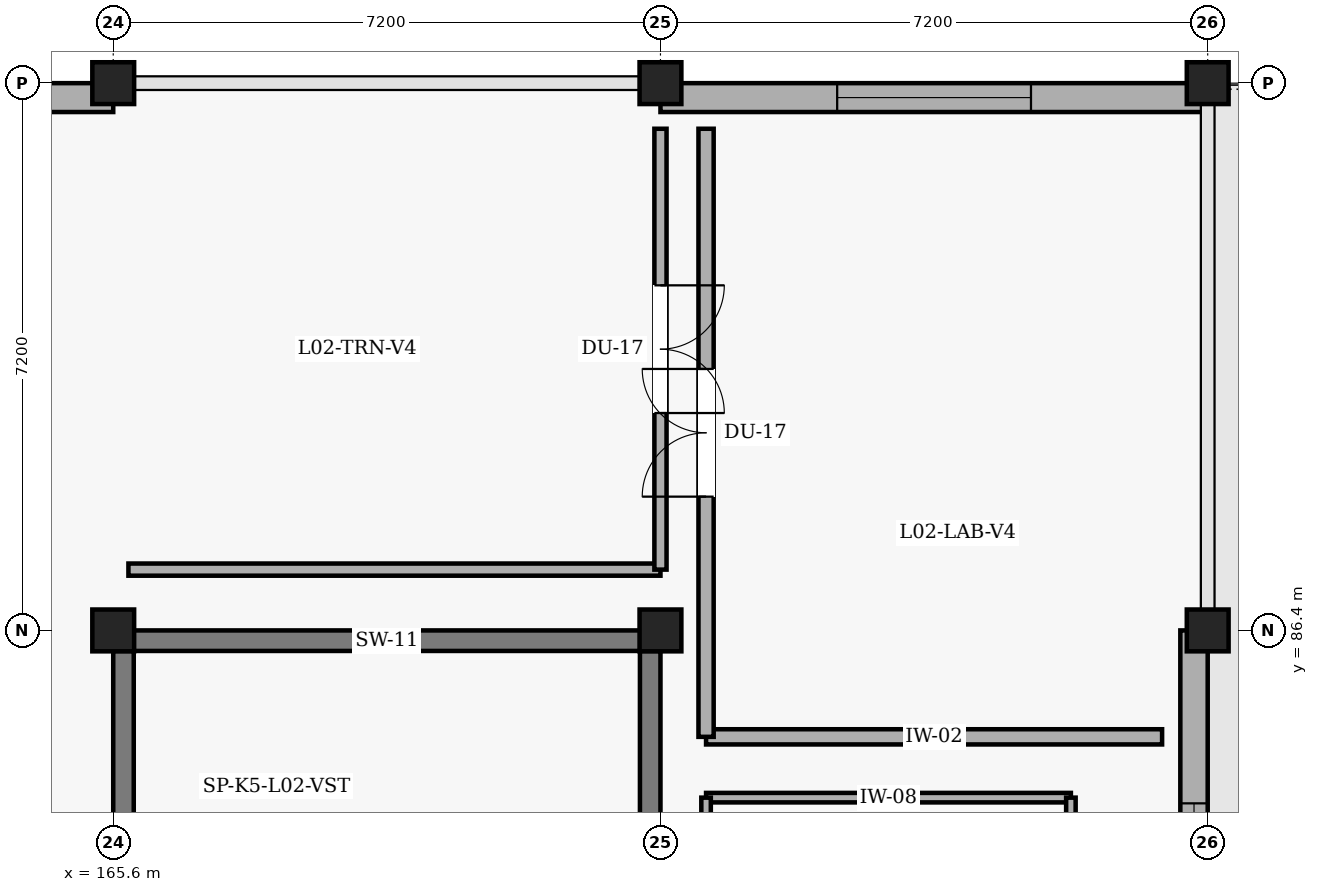
"""IFC4 building model, lengths in metres.
Left out: names, types, materials, properties, quantities, classifications, styles, units other than length and angle.
Written with IfcOpenShell. Run it as: python <this file> out.ifc"""

import sys

from ifc_helpers import new_model, si_unit, direction, frame, frame_2d, origin, origin_2d, place, context, subcontext, project, spatial, rectangle, extrude, element, fill, save


model = new_model("IFC4")
c1 = context("Model", 3, precision=1e-05, world=origin(), true_north=direction((0.0, 1.0)))
c2 = subcontext(c1, "Body", "Model", "MODEL_VIEW")
j1 = project(units=[si_unit("LENGTHUNIT", "METRE"), si_unit("PLANEANGLEUNIT", "RADIAN")], contexts=[c1])
p1 = place(None, origin())
s1 = spatial("IfcSite", under=j1, at=p1, CompositionType="ELEMENT")
p2 = place(p1, origin())
s2 = spatial("IfcBuilding", under=s1, at=p2, CompositionType="ELEMENT")
p3 = place(p2, frame((0.0, 0.0, 9.6)))
s3 = spatial("IfcBuildingStorey", under=s2, at=p3, CompositionType="ELEMENT", Elevation=9.6)
p4 = place(p3, frame((165.6, 86.265, 0.0), z_axis=(0.0, 0.0, 1.0), x_axis=(1.0, 0.0, 0.0)))
e1 = element("IfcWall", 1, at=p4, inside=s3, PredefinedType="SHEAR", context=c2, shape_type="SweptSolid", body=[
    extrude(rectangle(XDim=7.2, YDim=0.27, at=frame_2d((3.6, 0.0))), origin(), (0.0, 0.0, 1.0), 4.2),
])
p5 = place(p3, frame((172.665, 86.13, 0.0), z_axis=(0.0, 0.0, 1.0), x_axis=(0.0, -1.0, 0.0)))
e2 = element("IfcWall", 2, at=p5, inside=s3, PredefinedType="SHEAR", context=c2, shape_type="SweptSolid", body=[
    extrude(rectangle(XDim=13.86, YDim=0.27, at=frame_2d((6.93, 0.0))), origin(), (0.0, 0.0, 1.0), 4.2),
])
p6 = place(p3, frame((165.735, 72.27, 0.0), z_axis=(0.0, 0.0, 1.0), x_axis=(0.0, 1.0, 0.0)))
e3 = element("IfcWall", 3, at=p6, inside=s3, PredefinedType="SHEAR", context=c2, shape_type="SweptSolid", body=[
    extrude(rectangle(XDim=13.86, YDim=0.27, at=frame_2d((6.93, 0.0))), origin(), (0.0, 0.0, 1.0), 4.2),
])
p7 = place(p6, frame((9.8, 0.0, 0.0)))
e4 = element("IfcOpeningElement", 4, at=p7, cuts=e3, PredefinedType="OPENING", context=c2, shape_type="SweptSolid", body=[
    extrude(rectangle(XDim=1.25, YDim=2.2, at=frame_2d((0.625, 1.1))), frame((0.0, 0.145, 0.0), z_axis=(0.0, -1.0, 0.0), x_axis=(1.0, 0.0, 0.0)), (0.0, 0.0, 1.0), 0.29),
])
p8 = place(p3, frame((165.6, 86.4, 0.0), z_axis=(0.0, 0.0, 1.0), x_axis=(1.0, 0.0, 0.0)))
e5 = element("IfcColumn", 5, at=p8, inside=s3, PredefinedType="COLUMN", context=c2, shape_type="SweptSolid", body=[
    extrude(rectangle(XDim=0.55, YDim=0.55, at=origin_2d()), origin(), (0.0, 0.0, 1.0), 3.92),
])
p9 = place(p3, frame((165.6, 93.6, 0.0), z_axis=(0.0, 0.0, 1.0), x_axis=(1.0, 0.0, 0.0)))
e6 = element("IfcColumn", 6, at=p9, inside=s3, PredefinedType="COLUMN", context=c2, shape_type="SweptSolid", body=[
    extrude(rectangle(XDim=0.55, YDim=0.55, at=origin_2d()), origin(), (0.0, 0.0, 1.0), 3.95),
])
p10 = place(p3, frame((172.8, 86.4, 0.0), z_axis=(0.0, 0.0, 1.0), x_axis=(1.0, 0.0, 0.0)))
e7 = element("IfcColumn", 7, at=p10, inside=s3, PredefinedType="COLUMN", context=c2, shape_type="SweptSolid", body=[
    extrude(rectangle(XDim=0.55, YDim=0.55, at=origin_2d()), origin(), (0.0, 0.0, 1.0), 3.92),
])
p11 = place(p3, frame((172.8, 93.6, 0.0), z_axis=(0.0, 0.0, 1.0), x_axis=(1.0, 0.0, 0.0)))
e8 = element("IfcColumn", 8, at=p11, inside=s3, PredefinedType="COLUMN", context=c2, shape_type="SweptSolid", body=[
    extrude(rectangle(XDim=0.55, YDim=0.55, at=origin_2d()), origin(), (0.0, 0.0, 1.0), 3.95),
])
p12 = place(p3, frame((180.0, 86.4, 0.0), z_axis=(0.0, 0.0, 1.0), x_axis=(1.0, 0.0, 0.0)))
e9 = element("IfcColumn", 9, at=p12, inside=s3, PredefinedType="COLUMN", context=c2, shape_type="SweptSolid", body=[
    extrude(rectangle(XDim=0.55, YDim=0.55, at=origin_2d()), origin(), (0.0, 0.0, 1.0), 3.92),
])
p13 = place(p3, frame((180.0, 93.6, 0.0), z_axis=(0.0, 0.0, 1.0), x_axis=(1.0, 0.0, 0.0)))
e10 = element("IfcColumn", 10, at=p13, inside=s3, PredefinedType="COLUMN", context=c2, shape_type="SweptSolid", body=[
    extrude(rectangle(XDim=0.55, YDim=0.55, at=origin_2d()), origin(), (0.0, 0.0, 1.0), 3.95),
])
p14 = place(p3, frame((158.4, 93.41, 0.0), z_axis=(0.0, 0.0, 1.0), x_axis=(1.0, 0.0, 0.0)))
e11 = element("IfcWall", 11, at=p14, inside=s3, PredefinedType="SOLIDWALL", context=c2, shape_type="SweptSolid", body=[
    extrude(rectangle(XDim=7.2, YDim=0.38, at=frame_2d((3.6, 0.0))), origin(), (0.0, 0.0, 1.0), 3.65),
])
p15 = place(p14, frame((2.375, 0.0, 0.9)))
e12 = element("IfcOpeningElement", 12, at=p15, cuts=e11, PredefinedType="OPENING", context=c2, shape_type="SweptSolid", body=[
    extrude(rectangle(XDim=2.45, YDim=1.55, at=frame_2d((1.225, 0.775))), frame((0.0, 0.2, 0.0), z_axis=(0.0, -1.0, 0.0), x_axis=(1.0, 0.0, 0.0)), (0.0, 0.0, 1.0), 0.4),
])
p16 = place(p3, frame((172.8, 93.41, 0.0), z_axis=(0.0, 0.0, 1.0), x_axis=(1.0, 0.0, 0.0)))
e13 = element("IfcWall", 13, at=p16, inside=s3, PredefinedType="SOLIDWALL", context=c2, shape_type="SweptSolid", body=[
    extrude(rectangle(XDim=7.2, YDim=0.38, at=frame_2d((3.6, 0.0))), origin(), (0.0, 0.0, 1.0), 3.65),
])
p17 = place(p16, frame((2.325, 0.0, 0.9)))
e14 = element("IfcOpeningElement", 14, at=p17, cuts=e13, PredefinedType="OPENING", context=c2, shape_type="SweptSolid", body=[
    extrude(rectangle(XDim=2.55, YDim=1.6, at=frame_2d((1.275, 0.8))), frame((0.0, 0.2, 0.0), z_axis=(0.0, -1.0, 0.0), x_axis=(1.0, 0.0, 0.0)), (0.0, 0.0, 1.0), 0.4),
])
p18 = place(p3, frame((179.82, 86.4, 0.0), z_axis=(0.0, 0.0, 1.0), x_axis=(0.0, -1.0, 0.0)))
e15 = element("IfcWall", 15, at=p18, inside=s3, PredefinedType="SOLIDWALL", context=c2, shape_type="SweptSolid", body=[
    extrude(rectangle(XDim=7.2, YDim=0.36, at=frame_2d((3.6, 0.0))), origin(), (0.0, 0.0, 1.0), 3.62),
])
p19 = place(p18, frame((2.275, 0.0, 0.9)))
e16 = element("IfcOpeningElement", 16, at=p19, cuts=e15, PredefinedType="OPENING", context=c2, shape_type="SweptSolid", body=[
    extrude(rectangle(XDim=2.65, YDim=1.7, at=frame_2d((1.325, 0.85))), frame((0.0, 0.19, 0.0), z_axis=(0.0, -1.0, 0.0), x_axis=(1.0, 0.0, 0.0)), (0.0, 0.0, 1.0), 0.38),
])
p20 = place(p3, frame((173.4, 84.2, 0.0), z_axis=(0.0, 0.0, 1.0), x_axis=(1.0, 0.0, 0.0)))
e17 = element("IfcWall", 17, at=p20, inside=s3, PredefinedType="PARTITIONING", context=c2, shape_type="SweptSolid", body=[
    extrude(rectangle(XDim=4.8, YDim=0.125, at=frame_2d((2.4, 0.0))), origin(), (0.0, 0.0, 1.0), 3.85),
])
p21 = place(p3, frame((178.2, 84.2, 0.0), z_axis=(0.0, 0.0, 1.0), x_axis=(0.0, -1.0, 0.0)))
e18 = element("IfcWall", 18, at=p21, inside=s3, PredefinedType="PARTITIONING", context=c2, shape_type="SweptSolid", body=[
    extrude(rectangle(XDim=4.8, YDim=0.125, at=frame_2d((2.4, 0.0))), origin(), (0.0, 0.0, 1.0), 3.65),
])
p22 = place(p3, frame((173.4, 79.4, 0.0), z_axis=(0.0, 0.0, 1.0), x_axis=(0.0, 1.0, 0.0)))
e19 = element("IfcWall", 19, at=p22, inside=s3, PredefinedType="PARTITIONING", context=c2, shape_type="SweptSolid", body=[
    extrude(rectangle(XDim=4.8, YDim=0.125, at=frame_2d((2.4, 0.0))), origin(), (0.0, 0.0, 1.0), 3.65),
])
p23 = place(p22, frame((1.875, 0.0, 0.0)))
e20 = element("IfcOpeningElement", 20, at=p23, cuts=e19, PredefinedType="OPENING", context=c2, shape_type="SweptSolid", body=[
    extrude(rectangle(XDim=1.05, YDim=2.1, at=frame_2d((0.525, 1.05))), frame((0.0, 0.073, 0.0), z_axis=(0.0, -1.0, 0.0), x_axis=(1.0, 0.0, 0.0)), (0.0, 0.0, 1.0), 0.145),
])
p24 = place(p3, frame((179.4, 85.0, 0.0), z_axis=(0.0, 0.0, 1.0), x_axis=(-1.0, 0.0, 0.0)))
e21 = element("IfcWall", 21, at=p24, inside=s3, PredefinedType="PARTITIONING", context=c2, shape_type="SweptSolid", body=[
    extrude(rectangle(XDim=6.0, YDim=0.2, at=frame_2d((3.0, 0.0))), origin(), (0.0, 0.0, 1.0), 3.85),
])
p25 = place(p3, frame((173.4, 85.0, 0.0), z_axis=(0.0, 0.0, 1.0), x_axis=(0.0, 1.0, 0.0)))
e22 = element("IfcWall", 22, at=p25, inside=s3, PredefinedType="PARTITIONING", context=c2, shape_type="SweptSolid", body=[
    extrude(rectangle(XDim=8.0, YDim=0.2, at=frame_2d((4.0, 0.0))), origin(), (0.0, 0.0, 1.0), 3.62),
])
p26 = place(p25, frame((3.16, 0.0, 0.0)))
e23 = element("IfcOpeningElement", 23, at=p26, cuts=e22, PredefinedType="OPENING", context=c2, shape_type="SweptSolid", body=[
    extrude(rectangle(XDim=1.68, YDim=2.28, at=frame_2d((0.84, 1.14))), frame((0.0, 0.11, 0.0), z_axis=(0.0, -1.0, 0.0), x_axis=(1.0, 0.0, 0.0)), (0.0, 0.0, 1.0), 0.22),
])
p27 = place(p3, frame((172.8, 87.2, 0.0), z_axis=(0.0, 0.0, 1.0), x_axis=(-1.0, 0.0, 0.0)))
e24 = element("IfcWall", 24, at=p27, inside=s3, PredefinedType="PARTITIONING", context=c2, shape_type="SweptSolid", body=[
    extrude(rectangle(XDim=7.0, YDim=0.16, at=frame_2d((3.5, 0.0))), origin(), (0.0, 0.0, 1.0), 3.85),
])
p28 = place(p3, frame((172.8, 93.0, 0.0), z_axis=(0.0, 0.0, 1.0), x_axis=(0.0, -1.0, 0.0)))
e25 = element("IfcWall", 25, at=p28, inside=s3, PredefinedType="PARTITIONING", context=c2, shape_type="SweptSolid", body=[
    extrude(rectangle(XDim=5.8, YDim=0.16, at=frame_2d((2.9, 0.0))), origin(), (0.0, 0.0, 1.0), 3.55),
])
p29 = place(p28, frame((2.06, 0.0, 0.0)))
e26 = element("IfcOpeningElement", 26, at=p29, cuts=e25, PredefinedType="OPENING", context=c2, shape_type="SweptSolid", body=[
    extrude(rectangle(XDim=1.68, YDim=2.28, at=frame_2d((0.84, 1.14))), frame((0.0, 0.09, 0.0), z_axis=(0.0, -1.0, 0.0), x_axis=(1.0, 0.0, 0.0)), (0.0, 0.0, 1.0), 0.18),
])
p30 = place(p17, origin())
e27 = element("IfcWindow", 27, at=p30, inside=s3, PartitioningType="SINGLE_PANEL", PredefinedType="WINDOW", context=c2, shape_type="SweptSolid", body=[
    extrude(rectangle(XDim=2.55, YDim=1.6, at=frame_2d((1.275, 0.8))), frame((0.0, 0.03, 0.0), z_axis=(0.0, -1.0, 0.0), x_axis=(1.0, 0.0, 0.0)), (0.0, 0.0, 1.0), 0.06),
])
fill(e14, e27)
p31 = place(p19, origin())
e28 = element("IfcWindow", 28, at=p31, inside=s3, PartitioningType="SINGLE_PANEL", PredefinedType="WINDOW", context=c2, shape_type="SweptSolid", body=[
    extrude(rectangle(XDim=2.65, YDim=1.7, at=frame_2d((1.325, 0.85))), frame((0.0, 0.03, 0.0), z_axis=(0.0, -1.0, 0.0), x_axis=(1.0, 0.0, 0.0)), (0.0, 0.0, 1.0), 0.06),
])
fill(e16, e28)
p32 = place(p26, origin())
e29 = element("IfcDoor", 29, at=p32, inside=s3, OperationType="DOUBLE_DOOR_SINGLE_SWING", PredefinedType="DOOR", context=c2, shape_type="SweptSolid", body=[
    extrude(rectangle(XDim=1.68, YDim=2.28, at=frame_2d((0.84, 1.14))), frame((0.0, 0.025, 0.0), z_axis=(0.0, -1.0, 0.0), x_axis=(1.0, 0.0, 0.0)), (0.0, 0.0, 1.0), 0.05),
])
fill(e23, e29)
p33 = place(p29, origin())
e30 = element("IfcDoor", 30, at=p33, inside=s3, OperationType="DOUBLE_DOOR_SINGLE_SWING", PredefinedType="DOOR", context=c2, shape_type="SweptSolid", body=[
    extrude(rectangle(XDim=1.68, YDim=2.28, at=frame_2d((0.84, 1.14))), frame((0.0, 0.025, 0.0), z_axis=(0.0, -1.0, 0.0), x_axis=(1.0, 0.0, 0.0)), (0.0, 0.0, 1.0), 0.05),
])
fill(e26, e30)
save(model, sys.argv[1])
